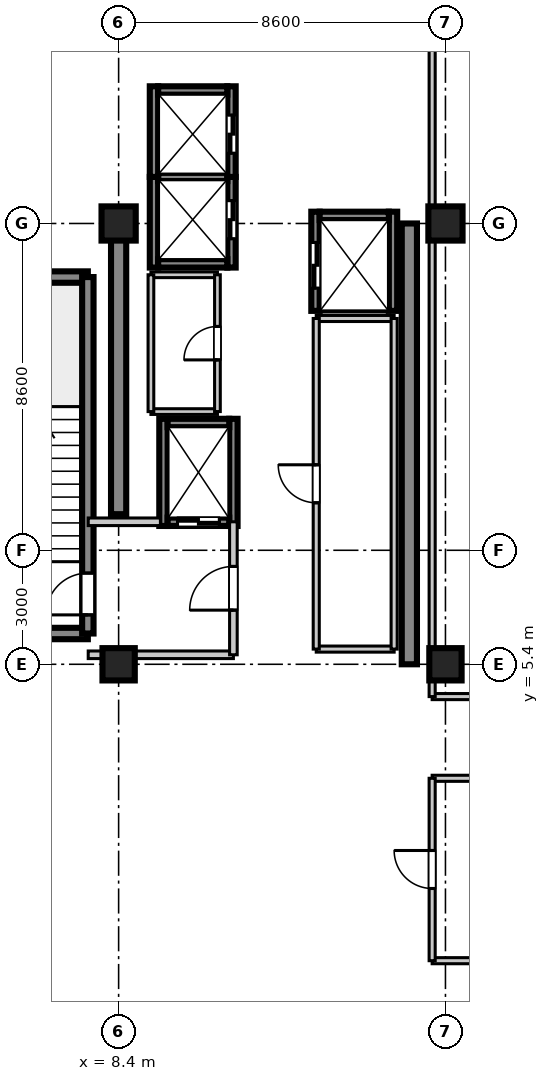
"""IFC4 building model, lengths in metres.
Left out: names, types, materials, properties, quantities, classifications, styles, units other than length and angle.
Written with IfcOpenShell. Run it as: python <this file> out.ifc"""

import sys

from ifc_helpers import new_model, si_unit, direction, frame, frame_2d, origin, origin_2d, place, context, subcontext, project, spatial, rectangle, extrude, source, transform, mapped, element, fill, save


model = new_model("IFC4")
c1 = context("Model", 3, precision=1e-05, world=origin(), true_north=direction((0.0, 1.0)))
c2 = subcontext(c1, "Body", "Model", "MODEL_VIEW")
j1 = project(units=[si_unit("LENGTHUNIT", "METRE"), si_unit("PLANEANGLEUNIT", "RADIAN")], contexts=[c1])
p1 = place(None, origin())
s1 = spatial("IfcSite", under=j1, at=p1, CompositionType="ELEMENT")
p2 = place(p1, origin())
s2 = spatial("IfcBuilding", under=s1, at=p2, CompositionType="ELEMENT")
p3 = place(p2, frame((0.0, 0.0, 343.05)))
s3 = spatial("IfcBuildingStorey", under=s2, at=p3, CompositionType="ELEMENT", Elevation=343.05)
m1 = source(origin(), c2, "Body", "SweptSolid", [
    extrude(rectangle(XDim=0.85, YDim=0.85, at=origin_2d()), origin(), (0.0, 0.0, 1.0), 4.455),
])
p4 = place(p3, frame((8.4, 5.4, 0.0), z_axis=(0.0, 0.0, 1.0), x_axis=(1.0, 0.0, 0.0)))
e1 = element("IfcColumn", 1, at=p4, inside=s3, PredefinedType="PILASTER", context=c2, shape_type="MappedRepresentation", body=[
    mapped(m1, transform((0.0, 0.0, 0.0), scale=1.0)),
])
m2 = source(origin(), c2, "Body", "SweptSolid", [
    extrude(rectangle(XDim=0.9, YDim=0.9, at=origin_2d()), origin(), (0.0, 0.0, 1.0), 4.455),
])
p5 = place(p3, frame((8.4, 17.0, 0.0), z_axis=(0.0, 0.0, 1.0), x_axis=(1.0, 0.0, 0.0)))
e2 = element("IfcColumn", 2, at=p5, inside=s3, PredefinedType="COLUMN", context=c2, shape_type="MappedRepresentation", body=[
    mapped(m2, transform((0.0, 0.0, 0.0), scale=1.0)),
])
p6 = place(p3, frame((17.0, 5.4, 0.0), z_axis=(0.0, 0.0, 1.0), x_axis=(1.0, 0.0, 0.0)))
e3 = element("IfcColumn", 3, at=p6, inside=s3, PredefinedType="PILASTER", context=c2, shape_type="MappedRepresentation", body=[
    mapped(m1, transform((0.0, 0.0, 0.0), scale=1.0)),
])
p7 = place(p3, frame((17.0, 17.0, 0.0), z_axis=(0.0, 0.0, 1.0), x_axis=(1.0, 0.0, 0.0)))
e4 = element("IfcColumn", 4, at=p7, inside=s3, PredefinedType="COLUMN", context=c2, shape_type="MappedRepresentation", body=[
    mapped(m2, transform((0.0, 0.0, 0.0), scale=1.0)),
])
m3 = source(origin(), c2, "Body", "SweptSolid", [
    extrude(rectangle(XDim=7.65, YDim=0.4, at=frame_2d((3.825, 0.0))), origin(), (0.0, 0.0, 1.0), 4.17),
])
p8 = place(p3, frame((8.4, 9.35, 0.0), z_axis=(0.0, 0.0, 1.0), x_axis=(0.0, 1.0, 0.0)))
e5 = element("IfcWall", 5, at=p8, inside=s3, PredefinedType="SHEAR", context=c2, shape_type="MappedRepresentation", body=[
    mapped(m3, transform((0.0, 0.0, 0.0), scale=1.0)),
])
m4 = source(origin(), c2, "Body", "SweptSolid", [
    extrude(rectangle(XDim=11.6, YDim=0.4, at=frame_2d((5.8, 0.0))), origin(), (0.0, 0.0, 1.0), 4.17),
])
p9 = place(p3, frame((16.05, 5.4, 0.0), z_axis=(0.0, 0.0, 1.0), x_axis=(0.0, 1.0, 0.0)))
e6 = element("IfcWall", 6, at=p9, inside=s3, PredefinedType="SHEAR", context=c2, shape_type="MappedRepresentation", body=[
    mapped(m4, transform((0.0, 0.0, 0.0), scale=1.0)),
])
m5 = source(origin(), c2, "Body", "SweptSolid", [
    extrude(rectangle(XDim=3.98, YDim=0.3, at=frame_2d((1.99, 0.0))), origin(), (0.0, 0.0, 1.0), 4.17),
])
for number, where, z_axis, x_axis in (
    (7, (3.61, 6.21, 0.0), (0.0, 0.0, 1.0), (1.0, 0.0, 0.0)),
    (8, (3.61, 15.59, 0.0), (0.0, 0.0, 1.0), (1.0, 0.0, 0.0)),
):
    element("IfcWall", number, at=place(p3, frame(where, z_axis=z_axis, x_axis=x_axis)), inside=s3, PredefinedType="SHEAR", context=c2, shape_type="MappedRepresentation", body=[
        mapped(m5, transform((0.0, 0.0, 0.0), scale=1.0)),
    ])
m6 = source(origin(), c2, "Body", "SweptSolid", [
    extrude(rectangle(XDim=9.38, YDim=0.3, at=frame_2d((4.69, 0.0))), origin(), (0.0, 0.0, 1.0), 4.17),
])
p10 = place(p3, frame((7.59, 6.21, 0.0), z_axis=(0.0, 0.0, 1.0), x_axis=(0.0, 1.0, 0.0)))
e9 = element("IfcWall", 9, at=p10, inside=s3, PredefinedType="SHEAR", context=c2, shape_type="MappedRepresentation", body=[
    mapped(m6, transform((0.0, 0.0, 0.0), scale=1.0)),
])
p11 = place(p10, frame((0.49, 0.0, 0.0)))
e10 = element("IfcOpeningElement", 10, at=p11, cuts=e9, PredefinedType="OPENING", context=c2, shape_type="SweptSolid", body=[
    extrude(rectangle(XDim=1.1, YDim=2.15, at=frame_2d((0.55, 1.075))), frame((0.0, 0.16, 0.0), z_axis=(0.0, -1.0, 0.0), x_axis=(1.0, 0.0, 0.0)), (0.0, 0.0, 1.0), 0.32),
])
m7 = source(origin(), c2, "Body", "SweptSolid", [
    extrude(rectangle(XDim=2.385, YDim=0.22, at=frame_2d((1.192, 0.0))), origin(), (0.0, 0.0, 1.0), 4.17),
])
p12 = place(p3, frame((9.33, 15.84, 0.0), z_axis=(0.0, 0.0, 1.0), x_axis=(0.0, 1.0, 0.0)))
e11 = element("IfcWall", 11, at=p12, inside=s3, PredefinedType="SHEAR", context=c2, shape_type="MappedRepresentation", body=[
    mapped(m7, transform((0.0, 0.0, 0.0), scale=1.0)),
])
p13 = place(p3, frame((11.37, 15.84, 0.0), z_axis=(0.0, 0.0, 1.0), x_axis=(0.0, 1.0, 0.0)))
e12 = element("IfcWall", 12, at=p13, inside=s3, PredefinedType="SHEAR", context=c2, shape_type="MappedRepresentation", body=[
    mapped(m7, transform((0.0, 0.0, 0.0), scale=1.0)),
])
p14 = place(p13, frame((0.76, 0.0, 0.0)))
e13 = element("IfcOpeningElement", 13, at=p14, cuts=e12, PredefinedType="OPENING", context=c2, shape_type="SweptSolid", body=[
    extrude(rectangle(XDim=1.0, YDim=2.2, at=frame_2d((0.5, 1.1))), frame((0.0, 0.12, 0.0), z_axis=(0.0, -1.0, 0.0), x_axis=(1.0, 0.0, 0.0)), (0.0, 0.0, 1.0), 0.24),
])
m8 = source(origin(), c2, "Body", "SweptSolid", [
    extrude(rectangle(XDim=1.82, YDim=0.22, at=frame_2d((0.91, 0.0))), origin(), (0.0, 0.0, 1.0), 4.17),
])
p15 = place(p3, frame((9.44, 15.95, 0.0), z_axis=(0.0, 0.0, 1.0), x_axis=(1.0, 0.0, 0.0)))
e14 = element("IfcWall", 14, at=p15, inside=s3, PredefinedType="SHEAR", context=c2, shape_type="MappedRepresentation", body=[
    mapped(m8, transform((0.0, 0.0, 0.0), scale=1.0)),
])
m9 = source(origin(), c2, "Body", "SweptSolid", [
    extrude(rectangle(XDim=1.82, YDim=0.22, at=frame_2d((0.91, 0.0))), origin(), (0.0, 0.0, 1.0), 4.5),
])
p16 = place(p3, frame((9.44, 18.225, 0.0), z_axis=(0.0, 0.0, 1.0), x_axis=(1.0, 0.0, 0.0)))
e15 = element("IfcWall", 15, at=p16, inside=s3, PredefinedType="SHEAR", context=c2, shape_type="MappedRepresentation", body=[
    mapped(m9, transform((0.0, 0.0, 0.0), scale=1.0)),
])
p17 = place(p3, frame((9.33, 18.225, 0.0), z_axis=(0.0, 0.0, 1.0), x_axis=(0.0, 1.0, 0.0)))
e16 = element("IfcWall", 16, at=p17, inside=s3, PredefinedType="SHEAR", context=c2, shape_type="MappedRepresentation", body=[
    mapped(m7, transform((0.0, 0.0, 0.0), scale=1.0)),
])
p18 = place(p3, frame((11.37, 18.225, 0.0), z_axis=(0.0, 0.0, 1.0), x_axis=(0.0, 1.0, 0.0)))
e17 = element("IfcWall", 17, at=p18, inside=s3, PredefinedType="SHEAR", context=c2, shape_type="MappedRepresentation", body=[
    mapped(m7, transform((0.0, 0.0, 0.0), scale=1.0)),
])
p19 = place(p18, frame((0.625, 0.0, 0.0)))
e18 = element("IfcOpeningElement", 18, at=p19, cuts=e17, PredefinedType="OPENING", context=c2, shape_type="SweptSolid", body=[
    extrude(rectangle(XDim=1.0, YDim=2.2, at=frame_2d((0.5, 1.1))), frame((0.0, 0.12, 0.0), z_axis=(0.0, -1.0, 0.0), x_axis=(1.0, 0.0, 0.0)), (0.0, 0.0, 1.0), 0.24),
])
p20 = place(p3, frame((9.44, 20.5, 0.0), z_axis=(0.0, 0.0, 1.0), x_axis=(1.0, 0.0, 0.0)))
e19 = element("IfcWall", 19, at=p20, inside=s3, PredefinedType="SHEAR", context=c2, shape_type="MappedRepresentation", body=[
    mapped(m8, transform((0.0, 0.0, 0.0), scale=1.0)),
])
m10 = source(origin(), c2, "Body", "SweptSolid", [
    extrude(rectangle(XDim=2.82, YDim=0.22, at=frame_2d((1.41, 0.0))), origin(), (0.0, 0.0, 1.0), 4.17),
])
for number, where, z_axis, x_axis in (
    (20, (9.58, 9.04, 0.0), (0.0, 0.0, 1.0), (0.0, 1.0, 0.0)),
    (21, (11.42, 9.04, 0.0), (0.0, 0.0, 1.0), (0.0, 1.0, 0.0)),
):
    element("IfcWall", number, at=place(p3, frame(where, z_axis=z_axis, x_axis=x_axis)), inside=s3, PredefinedType="SHEAR", context=c2, shape_type="MappedRepresentation", body=[
        mapped(m10, transform((0.0, 0.0, 0.0), scale=1.0)),
    ])
m11 = source(origin(), c2, "Body", "SweptSolid", [
    extrude(rectangle(XDim=1.62, YDim=0.22, at=frame_2d((0.81, 0.0))), origin(), (0.0, 0.0, 1.0), 4.17),
])
p21 = place(p3, frame((9.69, 9.15, 0.0), z_axis=(0.0, 0.0, 1.0), x_axis=(1.0, 0.0, 0.0)))
e22 = element("IfcWall", 22, at=p21, inside=s3, PredefinedType="SHEAR", context=c2, shape_type="MappedRepresentation", body=[
    mapped(m11, transform((0.0, 0.0, 0.0), scale=1.0)),
])
p22 = place(p21, frame((0.26, 0.0, 0.0)))
e23 = element("IfcOpeningElement", 23, at=p22, cuts=e22, PredefinedType="OPENING", context=c2, shape_type="SweptSolid", body=[
    extrude(rectangle(XDim=1.1, YDim=2.2, at=frame_2d((0.55, 1.1))), frame((0.0, 0.12, 0.0), z_axis=(0.0, -1.0, 0.0), x_axis=(1.0, 0.0, 0.0)), (0.0, 0.0, 1.0), 0.24),
])
p23 = place(p3, frame((9.69, 11.75, 0.0), z_axis=(0.0, 0.0, 1.0), x_axis=(1.0, 0.0, 0.0)))
e24 = element("IfcWall", 24, at=p23, inside=s3, PredefinedType="SHEAR", context=c2, shape_type="MappedRepresentation", body=[
    mapped(m11, transform((0.0, 0.0, 0.0), scale=1.0)),
])
m12 = source(origin(), c2, "Body", "SweptSolid", [
    extrude(rectangle(XDim=2.61, YDim=0.22, at=frame_2d((1.305, 0.0))), origin(), (0.0, 0.0, 1.0), 4.17),
])
p24 = place(p3, frame((13.58, 14.7, 0.0), z_axis=(0.0, 0.0, 1.0), x_axis=(0.0, 1.0, 0.0)))
e25 = element("IfcWall", 25, at=p24, inside=s3, PredefinedType="SHEAR", context=c2, shape_type="MappedRepresentation", body=[
    mapped(m12, transform((0.0, 0.0, 0.0), scale=1.0)),
])
p25 = place(p24, frame((0.6, 0.0, 0.0)))
e26 = element("IfcOpeningElement", 26, at=p25, cuts=e25, PredefinedType="OPENING", context=c2, shape_type="SweptSolid", body=[
    extrude(rectangle(XDim=1.2, YDim=2.2, at=frame_2d((0.6, 1.1))), frame((0.0, 0.12, 0.0), z_axis=(0.0, -1.0, 0.0), x_axis=(1.0, 0.0, 0.0)), (0.0, 0.0, 1.0), 0.24),
])
p26 = place(p3, frame((15.62, 14.7, 0.0), z_axis=(0.0, 0.0, 1.0), x_axis=(0.0, 1.0, 0.0)))
e27 = element("IfcWall", 27, at=p26, inside=s3, PredefinedType="SHEAR", context=c2, shape_type="MappedRepresentation", body=[
    mapped(m12, transform((0.0, 0.0, 0.0), scale=1.0)),
])
p27 = place(p3, frame((13.69, 17.2, 0.0), z_axis=(0.0, 0.0, 1.0), x_axis=(1.0, 0.0, 0.0)))
e28 = element("IfcWall", 28, at=p27, inside=s3, PredefinedType="SHEAR", context=c2, shape_type="MappedRepresentation", body=[
    mapped(m8, transform((0.0, 0.0, 0.0), scale=1.0)),
])
m13 = source(origin(), c2, "Body", "SweptSolid", [
    extrude(rectangle(XDim=3.82, YDim=0.2, at=frame_2d((1.91, 0.0))), origin(), (0.0, 0.0, 1.0), 3.4),
])
p28 = place(p3, frame((7.6, 5.65, 0.0), z_axis=(0.0, 0.0, 1.0), x_axis=(1.0, 0.0, 0.0)))
e29 = element("IfcWall", 29, at=p28, inside=s3, PredefinedType="PARTITIONING", context=c2, shape_type="MappedRepresentation", body=[
    mapped(m13, transform((0.0, 0.0, 0.0), scale=1.0)),
])
m14 = source(origin(), c2, "Body", "SweptSolid", [
    extrude(rectangle(XDim=1.9, YDim=0.2, at=frame_2d((0.95, 0.0))), origin(), (0.0, 0.0, 1.0), 3.4),
])
p29 = place(p3, frame((7.6, 9.15, 0.0), z_axis=(0.0, 0.0, 1.0), x_axis=(1.0, 0.0, 0.0)))
e30 = element("IfcWall", 30, at=p29, inside=s3, PredefinedType="PARTITIONING", context=c2, shape_type="MappedRepresentation", body=[
    mapped(m14, transform((0.0, 0.0, 0.0), scale=1.0)),
])
m15 = source(origin(), c2, "Body", "SweptSolid", [
    extrude(rectangle(XDim=3.5, YDim=0.2, at=frame_2d((1.75, 0.0))), origin(), (0.0, 0.0, 1.0), 3.4),
])
p30 = place(p3, frame((11.42, 5.65, 0.0), z_axis=(0.0, 0.0, 1.0), x_axis=(0.0, 1.0, 0.0)))
e31 = element("IfcWall", 31, at=p30, inside=s3, PredefinedType="PARTITIONING", context=c2, shape_type="MappedRepresentation", body=[
    mapped(m15, transform((0.0, 0.0, 0.0), scale=1.0)),
])
p31 = place(p30, frame((1.175, 0.0, 0.0)))
e32 = element("IfcOpeningElement", 32, at=p31, cuts=e31, PredefinedType="OPENING", context=c2, shape_type="SweptSolid", body=[
    extrude(rectangle(XDim=1.15, YDim=2.15, at=frame_2d((0.575, 1.075))), frame((0.0, 0.11, 0.0), z_axis=(0.0, -1.0, 0.0), x_axis=(1.0, 0.0, 0.0)), (0.0, 0.0, 1.0), 0.22),
])
m16 = source(origin(), c2, "Body", "SweptSolid", [
    extrude(rectangle(XDim=1.75, YDim=0.15, at=frame_2d((0.875, 0.0))), origin(), (0.0, 0.0, 1.0), 3.4),
])
for number, where, z_axis, x_axis in (
    (33, (9.25, 12.05, 0.0), (0.0, 0.0, 1.0), (1.0, 0.0, 0.0)),
    (34, (9.25, 15.65, 0.0), (0.0, 0.0, 1.0), (1.0, 0.0, 0.0)),
):
    element("IfcWall", number, at=place(p3, frame(where, z_axis=z_axis, x_axis=x_axis)), inside=s3, PredefinedType="PARTITIONING", context=c2, shape_type="MappedRepresentation", body=[
        mapped(m16, transform((0.0, 0.0, 0.0), scale=1.0)),
    ])
m17 = source(origin(), c2, "Body", "SweptSolid", [
    extrude(rectangle(XDim=3.6, YDim=0.15, at=frame_2d((1.8, 0.0))), origin(), (0.0, 0.0, 1.0), 3.4),
])
p32 = place(p3, frame((9.25, 12.05, 0.0), z_axis=(0.0, 0.0, 1.0), x_axis=(0.0, 1.0, 0.0)))
e35 = element("IfcWall", 35, at=p32, inside=s3, PredefinedType="PARTITIONING", context=c2, shape_type="MappedRepresentation", body=[
    mapped(m17, transform((0.0, 0.0, 0.0), scale=1.0)),
])
p33 = place(p3, frame((11.0, 12.05, 0.0), z_axis=(0.0, 0.0, 1.0), x_axis=(0.0, 1.0, 0.0)))
e36 = element("IfcWall", 36, at=p33, inside=s3, PredefinedType="PARTITIONING", context=c2, shape_type="MappedRepresentation", body=[
    mapped(m17, transform((0.0, 0.0, 0.0), scale=1.0)),
])
p34 = place(p33, frame((1.36, 0.0, 0.0)))
e37 = element("IfcOpeningElement", 37, at=p34, cuts=e36, PredefinedType="OPENING", context=c2, shape_type="SweptSolid", body=[
    extrude(rectangle(XDim=0.88, YDim=2.1, at=frame_2d((0.44, 1.05))), frame((0.0, 0.085, 0.0), z_axis=(0.0, -1.0, 0.0), x_axis=(1.0, 0.0, 0.0)), (0.0, 0.0, 1.0), 0.17),
])
m18 = source(origin(), c2, "Body", "SweptSolid", [
    extrude(rectangle(XDim=2.05, YDim=0.16, at=frame_2d((1.025, 0.0))), origin(), (0.0, 0.0, 1.0), 3.4),
])
for number, where, z_axis, x_axis in (
    (38, (13.6, 5.8, 0.0), (0.0, 0.0, 1.0), (1.0, 0.0, 0.0)),
    (39, (13.6, 14.5, 0.0), (0.0, 0.0, 1.0), (1.0, 0.0, 0.0)),
):
    element("IfcWall", number, at=place(p3, frame(where, z_axis=z_axis, x_axis=x_axis)), inside=s3, PredefinedType="PARTITIONING", context=c2, shape_type="MappedRepresentation", body=[
        mapped(m18, transform((0.0, 0.0, 0.0), scale=1.0)),
    ])
m19 = source(origin(), c2, "Body", "SweptSolid", [
    extrude(rectangle(XDim=8.7, YDim=0.16, at=frame_2d((4.35, 0.0))), origin(), (0.0, 0.0, 1.0), 3.4),
])
p35 = place(p3, frame((13.6, 5.8, 0.0), z_axis=(0.0, 0.0, 1.0), x_axis=(0.0, 1.0, 0.0)))
e40 = element("IfcWall", 40, at=p35, inside=s3, PredefinedType="PARTITIONING", context=c2, shape_type="MappedRepresentation", body=[
    mapped(m19, transform((0.0, 0.0, 0.0), scale=1.0)),
])
p36 = place(p35, frame((3.85, 0.0, 0.0)))
e41 = element("IfcOpeningElement", 41, at=p36, cuts=e40, PredefinedType="OPENING", context=c2, shape_type="SweptSolid", body=[
    extrude(rectangle(XDim=1.0, YDim=2.1, at=frame_2d((0.5, 1.05))), frame((0.0, 0.09, 0.0), z_axis=(0.0, -1.0, 0.0), x_axis=(1.0, 0.0, 0.0)), (0.0, 0.0, 1.0), 0.18),
])
p37 = place(p3, frame((15.65, 5.8, 0.0), z_axis=(0.0, 0.0, 1.0), x_axis=(0.0, 1.0, 0.0)))
e42 = element("IfcWall", 42, at=p37, inside=s3, PredefinedType="PARTITIONING", context=c2, shape_type="MappedRepresentation", body=[
    mapped(m19, transform((0.0, 0.0, 0.0), scale=1.0)),
])
m20 = source(origin(), c2, "Body", "SweptSolid", [
    extrude(rectangle(XDim=5.85, YDim=0.16, at=frame_2d((2.925, 0.0))), origin(), (0.0, 0.0, 1.0), 3.4),
])
for number, where, z_axis, x_axis in (
    (43, (16.65, -2.4, 0.0), (0.0, 0.0, 1.0), (1.0, 0.0, 0.0)),
    (44, (16.65, 2.4, 0.0), (0.0, 0.0, 1.0), (1.0, 0.0, 0.0)),
):
    element("IfcWall", number, at=place(p3, frame(where, z_axis=z_axis, x_axis=x_axis)), inside=s3, PredefinedType="PARTITIONING", context=c2, shape_type="MappedRepresentation", body=[
        mapped(m20, transform((0.0, 0.0, 0.0), scale=1.0)),
    ])
m21 = source(origin(), c2, "Body", "SweptSolid", [
    extrude(rectangle(XDim=4.8, YDim=0.16, at=frame_2d((2.4, 0.0))), origin(), (0.0, 0.0, 1.0), 3.4),
])
p38 = place(p3, frame((16.65, -2.4, 0.0), z_axis=(0.0, 0.0, 1.0), x_axis=(0.0, 1.0, 0.0)))
e45 = element("IfcWall", 45, at=p38, inside=s3, PredefinedType="PARTITIONING", context=c2, shape_type="MappedRepresentation", body=[
    mapped(m21, transform((0.0, 0.0, 0.0), scale=1.0)),
])
p39 = place(p38, frame((1.9, 0.0, 0.0)))
e46 = element("IfcOpeningElement", 46, at=p39, cuts=e45, PredefinedType="OPENING", context=c2, shape_type="SweptSolid", body=[
    extrude(rectangle(XDim=1.0, YDim=2.1, at=frame_2d((0.5, 1.05))), frame((0.0, 0.09, 0.0), z_axis=(0.0, -1.0, 0.0), x_axis=(1.0, 0.0, 0.0)), (0.0, 0.0, 1.0), 0.18),
])
p40 = place(p3, frame((16.65, 4.55, 0.0), z_axis=(0.0, 0.0, 1.0), x_axis=(1.0, 0.0, 0.0)))
e47 = element("IfcWall", 47, at=p40, inside=s3, PredefinedType="PARTITIONING", context=c2, shape_type="MappedRepresentation", body=[
    mapped(m20, transform((0.0, 0.0, 0.0), scale=1.0)),
])
p41 = place(p40, frame((3.42, 0.0, 0.0)))
e48 = element("IfcOpeningElement", 48, at=p41, cuts=e47, PredefinedType="OPENING", context=c2, shape_type="SweptSolid", body=[
    extrude(rectangle(XDim=1.5, YDim=2.15, at=frame_2d((0.75, 1.075))), frame((0.0, 0.09, 0.0), z_axis=(0.0, -1.0, 0.0), x_axis=(1.0, 0.0, 0.0)), (0.0, 0.0, 1.0), 0.18),
])
m22 = source(origin(), c2, "Body", "SweptSolid", [
    extrude(rectangle(XDim=17.95, YDim=0.16, at=frame_2d((8.975, 0.0))), origin(), (0.0, 0.0, 1.0), 3.4),
])
p42 = place(p3, frame((16.65, 4.55, 0.0), z_axis=(0.0, 0.0, 1.0), x_axis=(0.0, 1.0, 0.0)))
e49 = element("IfcWall", 49, at=p42, inside=s3, PredefinedType="PARTITIONING", context=c2, shape_type="MappedRepresentation", body=[
    mapped(m22, transform((0.0, 0.0, 0.0), scale=1.0)),
])
m23 = source(origin(), c2, "Body", "SweptSolid", [
    extrude(rectangle(XDim=1.1, YDim=2.15, at=frame_2d((0.55, 1.075))), frame((0.0, 0.025, 0.0), z_axis=(0.0, -1.0, 0.0), x_axis=(1.0, 0.0, 0.0)), (0.0, 0.0, 1.0), 0.05),
])
p43 = place(p11, origin())
e50 = element("IfcDoor", 50, at=p43, inside=s3, OperationType="SINGLE_SWING_LEFT", PredefinedType="DOOR", context=c2, shape_type="MappedRepresentation", body=[
    mapped(m23, transform((0.0, 0.0, 0.0), scale=1.0)),
])
fill(e10, e50)
m24 = source(origin(), c2, "Body", "SweptSolid", [
    extrude(rectangle(XDim=1.0, YDim=2.2, at=frame_2d((0.5, 1.1))), frame((0.0, 0.025, 0.0), z_axis=(0.0, -1.0, 0.0), x_axis=(1.0, 0.0, 0.0)), (0.0, 0.0, 1.0), 0.05),
])
p44 = place(p14, frame((1.0, 0.0, 0.0), z_axis=(0.0, 0.0, 1.0), x_axis=(-1.0, 0.0, 0.0)))
e51 = element("IfcDoor", 51, at=p44, inside=s3, OperationType="DOUBLE_DOOR_SLIDING", PredefinedType="DOOR", context=c2, shape_type="MappedRepresentation", body=[
    mapped(m24, transform((0.0, 0.0, 0.0), scale=1.0)),
])
fill(e13, e51)
p45 = place(p19, frame((1.0, 0.0, 0.0), z_axis=(0.0, 0.0, 1.0), x_axis=(-1.0, 0.0, 0.0)))
e52 = element("IfcDoor", 52, at=p45, inside=s3, OperationType="DOUBLE_DOOR_SLIDING", PredefinedType="DOOR", context=c2, shape_type="MappedRepresentation", body=[
    mapped(m24, transform((0.0, 0.0, 0.0), scale=1.0)),
])
fill(e18, e52)
m25 = source(origin(), c2, "Body", "SweptSolid", [
    extrude(rectangle(XDim=1.1, YDim=2.2, at=frame_2d((0.55, 1.1))), frame((0.0, 0.025, 0.0), z_axis=(0.0, -1.0, 0.0), x_axis=(1.0, 0.0, 0.0)), (0.0, 0.0, 1.0), 0.05),
])
p46 = place(p22, frame((1.1, 0.0, 0.0), z_axis=(0.0, 0.0, 1.0), x_axis=(-1.0, 0.0, 0.0)))
e53 = element("IfcDoor", 53, at=p46, inside=s3, OperationType="DOUBLE_DOOR_SLIDING", PredefinedType="DOOR", context=c2, shape_type="MappedRepresentation", body=[
    mapped(m25, transform((0.0, 0.0, 0.0), scale=1.0)),
])
fill(e23, e53)
m26 = source(origin(), c2, "Body", "SweptSolid", [
    extrude(rectangle(XDim=1.2, YDim=2.2, at=frame_2d((0.6, 1.1))), frame((0.0, 0.025, 0.0), z_axis=(0.0, -1.0, 0.0), x_axis=(1.0, 0.0, 0.0)), (0.0, 0.0, 1.0), 0.05),
])
p47 = place(p25, origin())
e54 = element("IfcDoor", 54, at=p47, inside=s3, OperationType="DOUBLE_DOOR_SLIDING", PredefinedType="DOOR", context=c2, shape_type="MappedRepresentation", body=[
    mapped(m26, transform((0.0, 0.0, 0.0), scale=1.0)),
])
fill(e26, e54)
m27 = source(origin(), c2, "Body", "SweptSolid", [
    extrude(rectangle(XDim=1.15, YDim=2.15, at=frame_2d((0.575, 1.075))), frame((0.0, 0.025, 0.0), z_axis=(0.0, -1.0, 0.0), x_axis=(1.0, 0.0, 0.0)), (0.0, 0.0, 1.0), 0.05),
])
p48 = place(p31, frame((1.15, 0.0, 0.0), z_axis=(0.0, 0.0, 1.0), x_axis=(-1.0, 0.0, 0.0)))
e55 = element("IfcDoor", 55, at=p48, inside=s3, OperationType="SINGLE_SWING_LEFT", PredefinedType="DOOR", context=c2, shape_type="MappedRepresentation", body=[
    mapped(m27, transform((0.0, 0.0, 0.0), scale=1.0)),
])
fill(e32, e55)
m28 = source(origin(), c2, "Body", "SweptSolid", [
    extrude(rectangle(XDim=0.88, YDim=2.1, at=frame_2d((0.44, 1.05))), frame((0.0, 0.025, 0.0), z_axis=(0.0, -1.0, 0.0), x_axis=(1.0, 0.0, 0.0)), (0.0, 0.0, 1.0), 0.05),
])
p49 = place(p34, origin())
e56 = element("IfcDoor", 56, at=p49, inside=s3, OperationType="SINGLE_SWING_LEFT", PredefinedType="DOOR", context=c2, shape_type="MappedRepresentation", body=[
    mapped(m28, transform((0.0, 0.0, 0.0), scale=1.0)),
])
fill(e37, e56)
m29 = source(origin(), c2, "Body", "SweptSolid", [
    extrude(rectangle(XDim=1.0, YDim=2.1, at=frame_2d((0.5, 1.05))), frame((0.0, 0.025, 0.0), z_axis=(0.0, -1.0, 0.0), x_axis=(1.0, 0.0, 0.0)), (0.0, 0.0, 1.0), 0.05),
])
p50 = place(p36, frame((1.0, 0.0, 0.0), z_axis=(0.0, 0.0, 1.0), x_axis=(-1.0, 0.0, 0.0)))
e57 = element("IfcDoor", 57, at=p50, inside=s3, OperationType="SINGLE_SWING_RIGHT", PredefinedType="DOOR", context=c2, shape_type="MappedRepresentation", body=[
    mapped(m29, transform((0.0, 0.0, 0.0), scale=1.0)),
])
fill(e41, e57)
p51 = place(p39, frame((1.0, 0.0, 0.0), z_axis=(0.0, 0.0, 1.0), x_axis=(-1.0, 0.0, 0.0)))
e58 = element("IfcDoor", 58, at=p51, inside=s3, OperationType="SINGLE_SWING_RIGHT", PredefinedType="DOOR", context=c2, shape_type="MappedRepresentation", body=[
    mapped(m29, transform((0.0, 0.0, 0.0), scale=1.0)),
])
fill(e46, e58)
save(model, sys.argv[1])
